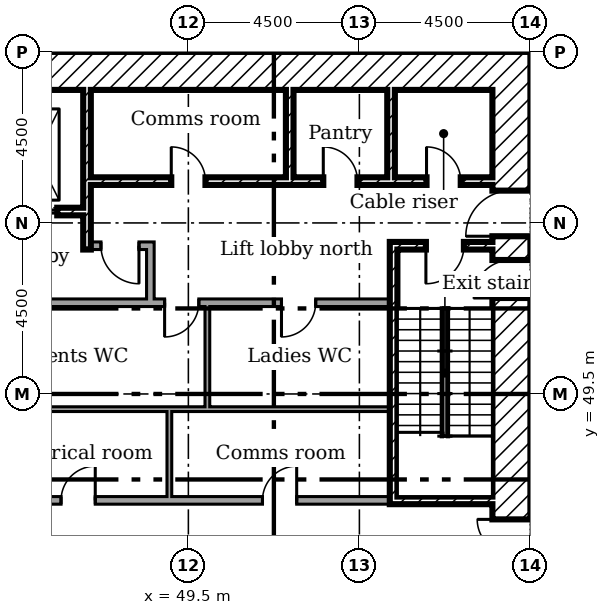
"""IFC4 building model, lengths in metres.
Left out: names, types, materials, properties, quantities, classifications, styles, units other than length and angle.
Written with IfcOpenShell. Run it as: python <this file> out.ifc"""

import sys

from ifc_helpers import new_model, si_unit, direction, frame, frame_2d, origin, place, context, subcontext, project, spatial, rectangle, extrude, element, fill, save


model = new_model("IFC4")
c1 = context("Model", 3, precision=1e-05, world=origin(), true_north=direction((0.0, 1.0)))
c2 = subcontext(c1, "Body", "Model", "MODEL_VIEW")
j1 = project(units=[si_unit("LENGTHUNIT", "METRE"), si_unit("PLANEANGLEUNIT", "RADIAN")], contexts=[c1])
p1 = place(None, origin())
s1 = spatial("IfcSite", under=j1, at=p1, CompositionType="ELEMENT")
p2 = place(p1, origin())
s2 = spatial("IfcBuilding", under=s1, at=p2, CompositionType="ELEMENT")
p3 = place(p2, frame((0.0, 0.0, 16.5)))
s3 = spatial("IfcBuildingStorey", under=s2, at=p3, CompositionType="ELEMENT", Elevation=16.5)
p4 = place(p3, frame((58.0, 40.5, 0.0), z_axis=(0.0, 0.0, 1.0), x_axis=(0.0, 1.0, 0.0)))
e1 = element("IfcWall", 1, at=p4, inside=s3, PredefinedType="SHEAR", context=c2, shape_type="SweptSolid", body=[
    extrude(rectangle(XDim=18.0, YDim=1.0, at=frame_2d((9.0, 0.0))), origin(), (0.0, 0.0, 1.0), 4.0),
])
p5 = place(p4, frame((13.15, 0.0, 0.0)))
e2 = element("IfcOpeningElement", 2, at=p5, cuts=e1, PredefinedType="OPENING", context=c2, shape_type="SweptSolid", body=[
    extrude(rectangle(XDim=1.2, YDim=2.1, at=frame_2d((0.6, 1.05))), frame((0.0, 0.51, 0.0), z_axis=(0.0, -1.0, 0.0), x_axis=(1.0, 0.0, 0.0)), (0.0, 0.0, 1.0), 1.02),
])
p6 = place(p4, frame((3.9, 0.0, 0.0)))
e3 = element("IfcOpeningElement", 3, at=p6, cuts=e1, PredefinedType="OPENING", context=c2, shape_type="SweptSolid", body=[
    extrude(rectangle(XDim=1.8, YDim=2.1, at=frame_2d((0.9, 1.05))), frame((0.0, 0.51, 0.0), z_axis=(0.0, -1.0, 0.0), x_axis=(1.0, 0.0, 0.0)), (0.0, 0.0, 1.0), 1.02),
])
p7 = place(p4, frame((11.525, 0.0, 0.0)))
e4 = element("IfcOpeningElement", 4, at=p7, cuts=e1, PredefinedType="OPENING", context=c2, shape_type="SweptSolid", body=[
    extrude(rectangle(XDim=1.0, YDim=2.1, at=frame_2d((0.5, 1.05))), frame((0.0, 0.51, 0.0), z_axis=(0.0, -1.0, 0.0), x_axis=(1.0, 0.0, 0.0)), (0.0, 0.0, 1.0), 1.02),
])
p8 = place(p3, frame((41.5, 58.0, 0.0)))
e5 = element("IfcWall", 5, at=p8, inside=s3, PredefinedType="SHEAR", context=c2, shape_type="SweptSolid", body=[
    extrude(rectangle(XDim=16.0, YDim=1.0, at=frame_2d((8.0, 0.0))), origin(), (0.0, 0.0, 1.0), 4.0),
])
p9 = place(p3, frame((46.833, 57.5, 0.0), z_axis=(0.0, 0.0, 1.0), x_axis=(0.0, -1.0, 0.0)))
e6 = element("IfcWall", 6, at=p9, inside=s3, PredefinedType="SHEAR", context=c2, shape_type="SweptSolid", body=[
    extrude(rectangle(XDim=4.2, YDim=0.2, at=frame_2d((2.1, 0.0))), origin(), (0.0, 0.0, 1.0), 4.0),
])
for number, where, z_axis, x_axis in (
    (7, (52.167, 57.5, 0.0), (0.0, 0.0, 1.0), (0.0, -1.0, 0.0)),
    (8, (54.833, 57.5, 0.0), (0.0, 0.0, 1.0), (0.0, -1.0, 0.0)),
):
    element("IfcWall", number, at=place(p3, frame(where, z_axis=z_axis, x_axis=x_axis)), inside=s3, PredefinedType="SHEAR", context=c2, shape_type="SweptSolid", body=[
        extrude(rectangle(XDim=2.3, YDim=0.2, at=frame_2d((1.15, 0.0))), origin(), (0.0, 0.0, 1.0), 4.0),
    ])
p10 = place(p3, frame((48.5, 51.9, 0.0), z_axis=(0.0, 0.0, 1.0), x_axis=(0.0, 1.0, 0.0)))
e9 = element("IfcWall", 9, at=p10, inside=s3, PredefinedType="PARTITIONING", context=c2, shape_type="SweptSolid", body=[
    extrude(rectangle(XDim=1.6, YDim=0.2, at=frame_2d((0.8, 0.0))), origin(), (0.0, 0.0, 1.0), 4.0),
])
p11 = place(p3, frame((46.933, 53.4, 0.0)))
e10 = element("IfcWall", 10, at=p11, inside=s3, PredefinedType="PARTITIONING", context=c2, shape_type="SweptSolid", body=[
    extrude(rectangle(XDim=1.467, YDim=0.2, at=frame_2d((0.733, 0.0))), origin(), (0.0, 0.0, 1.0), 4.0),
])
p12 = place(p11, frame((0.267, 0.0, 0.0)))
e11 = element("IfcOpeningElement", 11, at=p12, cuts=e10, PredefinedType="OPENING", context=c2, shape_type="SweptSolid", body=[
    extrude(rectangle(XDim=1.0, YDim=2.1, at=frame_2d((0.5, 1.05))), frame((0.0, 0.11, 0.0), z_axis=(0.0, -1.0, 0.0), x_axis=(1.0, 0.0, 0.0)), (0.0, 0.0, 1.0), 0.22),
])
p13 = place(p3, frame((46.933, 55.1, 0.0)))
e12 = element("IfcWall", 12, at=p13, inside=s3, PredefinedType="SHEAR", context=c2, shape_type="SweptSolid", body=[
    extrude(rectangle(XDim=10.567, YDim=0.2, at=frame_2d((5.283, 0.0))), origin(), (0.0, 0.0, 1.0), 4.0),
])
p14 = place(p13, frame((8.833, 0.0, 0.0)))
e13 = element("IfcOpeningElement", 13, at=p14, cuts=e12, PredefinedType="OPENING", context=c2, shape_type="SweptSolid", body=[
    extrude(rectangle(XDim=0.9, YDim=2.1, at=frame_2d((0.45, 1.05))), frame((0.0, 0.11, 0.0), z_axis=(0.0, -1.0, 0.0), x_axis=(1.0, 0.0, 0.0)), (0.0, 0.0, 1.0), 0.22),
])
p15 = place(p13, frame((2.117, 0.0, 0.0)))
e14 = element("IfcOpeningElement", 14, at=p15, cuts=e12, PredefinedType="OPENING", context=c2, shape_type="SweptSolid", body=[
    extrude(rectangle(XDim=0.9, YDim=2.1, at=frame_2d((0.45, 1.05))), frame((0.0, 0.11, 0.0), z_axis=(0.0, -1.0, 0.0), x_axis=(1.0, 0.0, 0.0)), (0.0, 0.0, 1.0), 0.22),
])
p16 = place(p13, frame((6.117, 0.0, 0.0)))
e15 = element("IfcOpeningElement", 15, at=p16, cuts=e12, PredefinedType="OPENING", context=c2, shape_type="SweptSolid", body=[
    extrude(rectangle(XDim=0.9, YDim=2.1, at=frame_2d((0.45, 1.05))), frame((0.0, 0.11, 0.0), z_axis=(0.0, -1.0, 0.0), x_axis=(1.0, 0.0, 0.0)), (0.0, 0.0, 1.0), 0.22),
])
p17 = place(p3, frame((41.5, 54.3, 0.0)))
e16 = element("IfcWall", 16, at=p17, inside=s3, PredefinedType="SHEAR", context=c2, shape_type="SweptSolid", body=[
    extrude(rectangle(XDim=5.233, YDim=0.2, at=frame_2d((2.617, 0.0))), origin(), (0.0, 0.0, 1.0), 4.0),
])
p18 = place(p17, frame((0.783, 0.0, 0.0)))
e17 = element("IfcOpeningElement", 17, at=p18, cuts=e16, PredefinedType="OPENING", context=c2, shape_type="SweptSolid", body=[
    extrude(rectangle(XDim=1.1, YDim=2.1, at=frame_2d((0.55, 1.05))), frame((0.0, 0.11, 0.0), z_axis=(0.0, -1.0, 0.0), x_axis=(1.0, 0.0, 0.0)), (0.0, 0.0, 1.0), 0.22),
])
p19 = place(p17, frame((3.45, 0.0, 0.0)))
e18 = element("IfcOpeningElement", 18, at=p19, cuts=e16, PredefinedType="OPENING", context=c2, shape_type="SweptSolid", body=[
    extrude(rectangle(XDim=1.1, YDim=2.1, at=frame_2d((0.55, 1.05))), frame((0.0, 0.11, 0.0), z_axis=(0.0, -1.0, 0.0), x_axis=(1.0, 0.0, 0.0)), (0.0, 0.0, 1.0), 0.22),
])
p20 = place(p3, frame((54.8, 53.4, 0.0)))
e19 = element("IfcWall", 19, at=p20, inside=s3, PredefinedType="SHEAR", context=c2, shape_type="SweptSolid", body=[
    extrude(rectangle(XDim=2.7, YDim=0.2, at=frame_2d((1.35, 0.0))), origin(), (0.0, 0.0, 1.0), 4.0),
])
p21 = place(p20, frame((0.95, 0.0, 0.0)))
e20 = element("IfcOpeningElement", 20, at=p21, cuts=e19, PredefinedType="OPENING", context=c2, shape_type="SweptSolid", body=[
    extrude(rectangle(XDim=1.0, YDim=2.1, at=frame_2d((0.5, 1.05))), frame((0.0, 0.11, 0.0), z_axis=(0.0, -1.0, 0.0), x_axis=(1.0, 0.0, 0.0)), (0.0, 0.0, 1.0), 0.22),
])
p22 = place(p3, frame((54.8, 46.7, 0.0)))
e21 = element("IfcWall", 21, at=p22, inside=s3, PredefinedType="SHEAR", context=c2, shape_type="SweptSolid", body=[
    extrude(rectangle(XDim=2.7, YDim=0.2, at=frame_2d((1.35, 0.0))), origin(), (0.0, 0.0, 1.0), 4.0),
])
p23 = place(p3, frame((54.9, 46.8, 0.0), z_axis=(0.0, 0.0, 1.0), x_axis=(0.0, 1.0, 0.0)))
e22 = element("IfcWall", 22, at=p23, inside=s3, PredefinedType="SHEAR", context=c2, shape_type="SweptSolid", body=[
    extrude(rectangle(XDim=6.5, YDim=0.2, at=frame_2d((3.25, 0.0))), origin(), (0.0, 0.0, 1.0), 4.0),
])
p24 = place(p3, frame((44.2, 51.9, 0.0)))
e23 = element("IfcWall", 23, at=p24, inside=s3, PredefinedType="PARTITIONING", context=c2, shape_type="SweptSolid", body=[
    extrude(rectangle(XDim=10.6, YDim=0.2, at=frame_2d((5.3, 0.0))), origin(), (0.0, 0.0, 1.0), 4.0),
])
p25 = place(p24, frame((4.675, 0.0, 0.0)))
e24 = element("IfcOpeningElement", 24, at=p25, cuts=e23, PredefinedType="OPENING", context=c2, shape_type="SweptSolid", body=[
    extrude(rectangle(XDim=0.9, YDim=2.1, at=frame_2d((0.45, 1.05))), frame((0.0, 0.11, 0.0), z_axis=(0.0, -1.0, 0.0), x_axis=(1.0, 0.0, 0.0)), (0.0, 0.0, 1.0), 0.22),
])
p26 = place(p24, frame((7.75, 0.0, 0.0)))
e25 = element("IfcOpeningElement", 25, at=p26, cuts=e23, PredefinedType="OPENING", context=c2, shape_type="SweptSolid", body=[
    extrude(rectangle(XDim=0.9, YDim=2.1, at=frame_2d((0.45, 1.05))), frame((0.0, 0.11, 0.0), z_axis=(0.0, -1.0, 0.0), x_axis=(1.0, 0.0, 0.0)), (0.0, 0.0, 1.0), 0.22),
])
p27 = place(p3, frame((44.2, 46.7, 0.0)))
e26 = element("IfcWall", 26, at=p27, inside=s3, PredefinedType="PARTITIONING", context=c2, shape_type="SweptSolid", body=[
    extrude(rectangle(XDim=10.6, YDim=0.2, at=frame_2d((5.3, 0.0))), origin(), (0.0, 0.0, 1.0), 4.0),
])
p28 = place(p27, frame((1.95, 0.0, 0.0)))
e27 = element("IfcOpeningElement", 27, at=p28, cuts=e26, PredefinedType="OPENING", context=c2, shape_type="SweptSolid", body=[
    extrude(rectangle(XDim=0.9, YDim=2.1, at=frame_2d((0.45, 1.05))), frame((0.0, 0.11, 0.0), z_axis=(0.0, -1.0, 0.0), x_axis=(1.0, 0.0, 0.0)), (0.0, 0.0, 1.0), 0.22),
])
p29 = place(p27, frame((7.25, 0.0, 0.0)))
e28 = element("IfcOpeningElement", 28, at=p29, cuts=e26, PredefinedType="OPENING", context=c2, shape_type="SweptSolid", body=[
    extrude(rectangle(XDim=0.9, YDim=2.1, at=frame_2d((0.45, 1.05))), frame((0.0, 0.11, 0.0), z_axis=(0.0, -1.0, 0.0), x_axis=(1.0, 0.0, 0.0)), (0.0, 0.0, 1.0), 0.22),
])
p30 = place(p3, frame((49.0, 46.8, 0.0), z_axis=(0.0, 0.0, 1.0), x_axis=(0.0, 1.0, 0.0)))
e29 = element("IfcWall", 29, at=p30, inside=s3, PredefinedType="PARTITIONING", context=c2, shape_type="SweptSolid", body=[
    extrude(rectangle(XDim=2.363, YDim=0.125, at=frame_2d((1.181, 0.0))), origin(), (0.0, 0.0, 1.0), 4.0),
])
p31 = place(p3, frame((49.0, 49.1, 0.0), z_axis=(0.0, 0.0, 1.0), x_axis=(-1.0, 0.0, 0.0)))
e30 = element("IfcWall", 30, at=p31, inside=s3, PredefinedType="PARTITIONING", context=c2, shape_type="SweptSolid", body=[
    extrude(rectangle(XDim=4.8, YDim=0.125, at=frame_2d((2.4, 0.0))), origin(), (0.0, 0.0, 1.0), 4.0),
])
p32 = place(p3, frame((50.062, 49.1, 0.0), z_axis=(0.0, 0.0, 1.0), x_axis=(-1.0, 0.0, 0.0)))
e31 = element("IfcWall", 31, at=p32, inside=s3, PredefinedType="PARTITIONING", context=c2, shape_type="SweptSolid", body=[
    extrude(rectangle(XDim=1.0, YDim=0.125, at=frame_2d((0.5, 0.0))), origin(), (0.0, 0.0, 1.0), 4.0),
])
p33 = place(p3, frame((54.8, 49.1, 0.0), z_axis=(0.0, 0.0, 1.0), x_axis=(-1.0, 0.0, 0.0)))
e32 = element("IfcWall", 32, at=p33, inside=s3, PredefinedType="PARTITIONING", context=c2, shape_type="SweptSolid", body=[
    extrude(rectangle(XDim=4.8, YDim=0.125, at=frame_2d((2.4, 0.0))), origin(), (0.0, 0.0, 1.0), 4.0),
])
p34 = place(p3, frame((50.0, 49.163, 0.0), z_axis=(0.0, 0.0, 1.0), x_axis=(0.0, 1.0, 0.0)))
e33 = element("IfcWall", 33, at=p34, inside=s3, PredefinedType="PARTITIONING", context=c2, shape_type="SweptSolid", body=[
    extrude(rectangle(XDim=2.637, YDim=0.125, at=frame_2d((1.319, 0.0))), origin(), (0.0, 0.0, 1.0), 4.0),
])
p35 = place(p5, origin())
e34 = element("IfcDoor", 34, at=p35, inside=s3, OperationType="SINGLE_SWING_RIGHT", PredefinedType="DOOR", context=c2, shape_type="SweptSolid", body=[
    extrude(rectangle(XDim=1.2, YDim=2.1, at=frame_2d((0.6, 1.05))), frame((0.0, 0.025, 0.0), z_axis=(0.0, -1.0, 0.0), x_axis=(1.0, 0.0, 0.0)), (0.0, 0.0, 1.0), 0.05),
])
fill(e2, e34)
p36 = place(p6, origin())
e35 = element("IfcDoor", 35, at=p36, inside=s3, OperationType="DOUBLE_DOOR_SINGLE_SWING", PredefinedType="DOOR", context=c2, shape_type="SweptSolid", body=[
    extrude(rectangle(XDim=1.8, YDim=2.1, at=frame_2d((0.9, 1.05))), frame((0.0, 0.025, 0.0), z_axis=(0.0, -1.0, 0.0), x_axis=(1.0, 0.0, 0.0)), (0.0, 0.0, 1.0), 0.05),
])
fill(e3, e35)
p37 = place(p21, frame((1.0, 0.0, 0.0), x_axis=(-1.0, 0.0, 0.0)))
e36 = element("IfcDoor", 36, at=p37, inside=s3, OperationType="SINGLE_SWING_LEFT", PredefinedType="DOOR", context=c2, shape_type="SweptSolid", body=[
    extrude(rectangle(XDim=1.0, YDim=2.1, at=frame_2d((0.5, 1.05))), frame((0.0, 0.025, 0.0), z_axis=(0.0, -1.0, 0.0), x_axis=(1.0, 0.0, 0.0)), (0.0, 0.0, 1.0), 0.05),
])
fill(e20, e36)
p38 = place(p7, origin())
e37 = element("IfcDoor", 37, at=p38, inside=s3, OperationType="SINGLE_SWING_RIGHT", PredefinedType="DOOR", context=c2, shape_type="SweptSolid", body=[
    extrude(rectangle(XDim=1.0, YDim=2.1, at=frame_2d((0.5, 1.05))), frame((0.0, 0.025, 0.0), z_axis=(0.0, -1.0, 0.0), x_axis=(1.0, 0.0, 0.0)), (0.0, 0.0, 1.0), 0.05),
])
fill(e4, e37)
p39 = place(p12, frame((1.0, 0.0, 0.0), x_axis=(-1.0, 0.0, 0.0)))
e38 = element("IfcDoor", 38, at=p39, inside=s3, OperationType="SINGLE_SWING_RIGHT", PredefinedType="DOOR", context=c2, shape_type="SweptSolid", body=[
    extrude(rectangle(XDim=1.0, YDim=2.1, at=frame_2d((0.5, 1.05))), frame((0.0, 0.025, 0.0), z_axis=(0.0, -1.0, 0.0), x_axis=(1.0, 0.0, 0.0)), (0.0, 0.0, 1.0), 0.05),
])
fill(e11, e38)
p40 = place(p14, origin())
e39 = element("IfcDoor", 39, at=p40, inside=s3, OperationType="SINGLE_SWING_RIGHT", PredefinedType="DOOR", context=c2, shape_type="SweptSolid", body=[
    extrude(rectangle(XDim=0.9, YDim=2.1, at=frame_2d((0.45, 1.05))), frame((0.0, 0.025, 0.0), z_axis=(0.0, -1.0, 0.0), x_axis=(1.0, 0.0, 0.0)), (0.0, 0.0, 1.0), 0.05),
])
fill(e13, e39)
p41 = place(p15, origin())
e40 = element("IfcDoor", 40, at=p41, inside=s3, OperationType="SINGLE_SWING_RIGHT", PredefinedType="DOOR", context=c2, shape_type="SweptSolid", body=[
    extrude(rectangle(XDim=0.9, YDim=2.1, at=frame_2d((0.45, 1.05))), frame((0.0, 0.025, 0.0), z_axis=(0.0, -1.0, 0.0), x_axis=(1.0, 0.0, 0.0)), (0.0, 0.0, 1.0), 0.05),
])
fill(e14, e40)
p42 = place(p16, origin())
e41 = element("IfcDoor", 41, at=p42, inside=s3, OperationType="SINGLE_SWING_RIGHT", PredefinedType="DOOR", context=c2, shape_type="SweptSolid", body=[
    extrude(rectangle(XDim=0.9, YDim=2.1, at=frame_2d((0.45, 1.05))), frame((0.0, 0.025, 0.0), z_axis=(0.0, -1.0, 0.0), x_axis=(1.0, 0.0, 0.0)), (0.0, 0.0, 1.0), 0.05),
])
fill(e15, e41)
p43 = place(p28, origin())
e42 = element("IfcDoor", 42, at=p43, inside=s3, OperationType="SINGLE_SWING_LEFT", PredefinedType="DOOR", context=c2, shape_type="SweptSolid", body=[
    extrude(rectangle(XDim=0.9, YDim=2.1, at=frame_2d((0.45, 1.05))), frame((0.0, 0.025, 0.0), z_axis=(0.0, -1.0, 0.0), x_axis=(1.0, 0.0, 0.0)), (0.0, 0.0, 1.0), 0.05),
])
fill(e27, e42)
p44 = place(p29, origin())
e43 = element("IfcDoor", 43, at=p44, inside=s3, OperationType="SINGLE_SWING_LEFT", PredefinedType="DOOR", context=c2, shape_type="SweptSolid", body=[
    extrude(rectangle(XDim=0.9, YDim=2.1, at=frame_2d((0.45, 1.05))), frame((0.0, 0.025, 0.0), z_axis=(0.0, -1.0, 0.0), x_axis=(1.0, 0.0, 0.0)), (0.0, 0.0, 1.0), 0.05),
])
fill(e28, e43)
p45 = place(p25, frame((0.9, 0.0, 0.0), x_axis=(-1.0, 0.0, 0.0)))
e44 = element("IfcDoor", 44, at=p45, inside=s3, OperationType="SINGLE_SWING_LEFT", PredefinedType="DOOR", context=c2, shape_type="SweptSolid", body=[
    extrude(rectangle(XDim=0.9, YDim=2.1, at=frame_2d((0.45, 1.05))), frame((0.0, 0.025, 0.0), z_axis=(0.0, -1.0, 0.0), x_axis=(1.0, 0.0, 0.0)), (0.0, 0.0, 1.0), 0.05),
])
fill(e24, e44)
p46 = place(p26, frame((0.9, 0.0, 0.0), x_axis=(-1.0, 0.0, 0.0)))
e45 = element("IfcDoor", 45, at=p46, inside=s3, OperationType="SINGLE_SWING_LEFT", PredefinedType="DOOR", context=c2, shape_type="SweptSolid", body=[
    extrude(rectangle(XDim=0.9, YDim=2.1, at=frame_2d((0.45, 1.05))), frame((0.0, 0.025, 0.0), z_axis=(0.0, -1.0, 0.0), x_axis=(1.0, 0.0, 0.0)), (0.0, 0.0, 1.0), 0.05),
])
fill(e25, e45)
p47 = place(p19, origin())
e46 = element("IfcDoor", 46, at=p47, inside=s3, OperationType="SLIDING_TO_LEFT", PredefinedType="DOOR", context=c2, shape_type="SweptSolid", body=[
    extrude(rectangle(XDim=1.1, YDim=2.1, at=frame_2d((0.55, 1.05))), frame((0.0, 0.025, 0.0), z_axis=(0.0, -1.0, 0.0), x_axis=(1.0, 0.0, 0.0)), (0.0, 0.0, 1.0), 0.05),
])
fill(e18, e46)
save(model, sys.argv[1])
